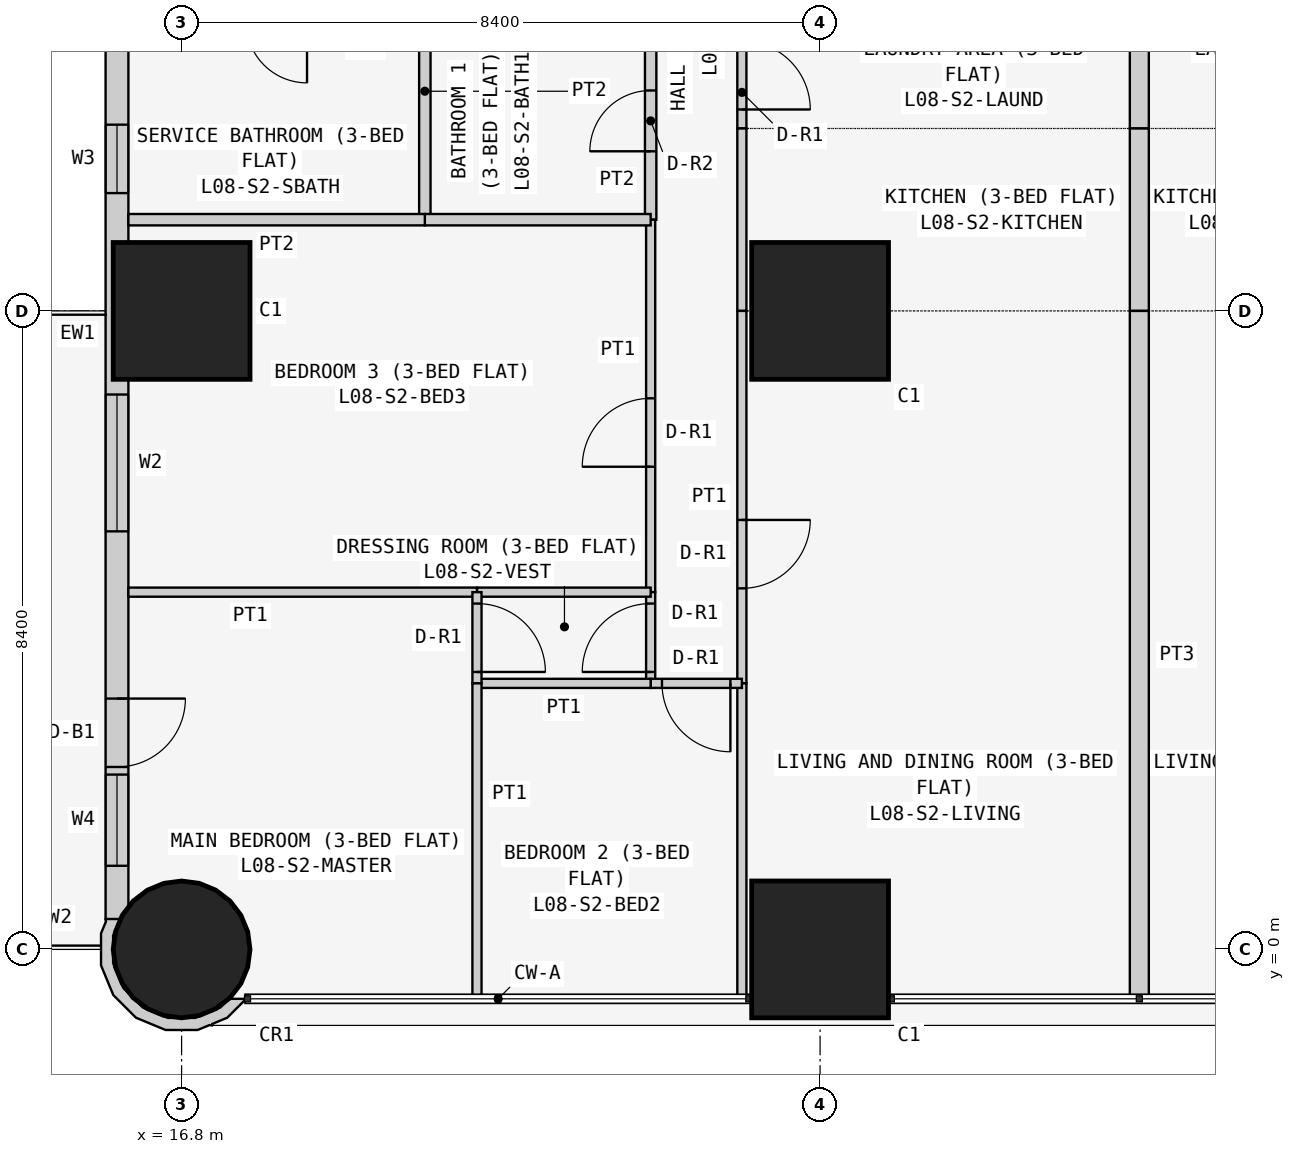
"""IFC4 building model, lengths in metres.
Left out: names, types, materials, properties, quantities, classifications, styles, units other than length and angle.
Written with IfcOpenShell. Run it as: python <this file> out.ifc"""

import sys

from ifc_helpers import new_model, si_unit, direction, frame, frame_2d, origin, origin_2d, place, context, subcontext, project, spatial, polyline, rectangle, circle, outline, extrude, element, fill, save


model = new_model("IFC4")
c1 = context("Model", 3, precision=1e-05, world=origin(), true_north=direction((0.0, 1.0)))
c2 = subcontext(c1, "Body", "Model", "MODEL_VIEW")
j1 = project(units=[si_unit("LENGTHUNIT", "METRE"), si_unit("PLANEANGLEUNIT", "RADIAN")], contexts=[c1])
p1 = place(None, origin())
s1 = spatial("IfcSite", under=j1, at=p1, CompositionType="ELEMENT")
p2 = place(p1, origin())
s2 = spatial("IfcBuilding", under=s1, at=p2, CompositionType="ELEMENT")
p3 = place(p2, frame((0.0, 0.0, 38.1)))
s3 = spatial("IfcBuildingStorey", under=s2, at=p3, CompositionType="ELEMENT", Elevation=38.1)
p4 = place(p3, frame((16.8, 0.0, 0.0), z_axis=(0.0, 0.0, 1.0), x_axis=(1.0, 0.0, 0.0)))
e1 = element("IfcColumn", 1, at=p4, inside=s3, PredefinedType="COLUMN", context=c2, shape_type="SweptSolid", body=[
    extrude(circle(Radius=0.9, at=origin_2d()), origin(), (0.0, 0.0, 1.0), 3.6),
])
for number, where, z_axis, x_axis in (
    (2, (16.8, 8.4, 0.0), (0.0, 0.0, 1.0), (1.0, 0.0, 0.0)),
    (3, (25.2, 0.0, 0.0), (0.0, 0.0, 1.0), (1.0, 0.0, 0.0)),
    (4, (25.2, 8.4, 0.0), (0.0, 0.0, 1.0), (1.0, 0.0, 0.0)),
):
    element("IfcColumn", number, at=place(p3, frame(where, z_axis=z_axis, x_axis=x_axis)), inside=s3, PredefinedType="COLUMN", context=c2, shape_type="SweptSolid", body=[
        extrude(rectangle(XDim=1.8, YDim=1.8, at=origin_2d()), origin(), (0.0, 0.0, 1.0), 3.6),
    ])
p5 = place(p3, frame((15.95, 15.8, 0.0), z_axis=(0.0, 0.0, 1.0), x_axis=(0.0, -1.0, 0.0)))
e5 = element("IfcWall", 5, at=p5, inside=s3, PredefinedType="SOLIDWALL", context=c2, shape_type="SweptSolid", body=[
    extrude(rectangle(XDim=15.4, YDim=0.3, at=frame_2d((7.7, 0.0))), origin(), (0.0, 0.0, 1.0), 3.45),
])
p6 = place(p5, frame((1.2, 0.0, 0.9)))
e6 = element("IfcOpeningElement", 6, at=p6, cuts=e5, PredefinedType="OPENING", context=c2, shape_type="SweptSolid", body=[
    extrude(rectangle(XDim=1.8, YDim=1.5, at=frame_2d((0.9, 0.75))), frame((0.0, 0.16, 0.0), z_axis=(0.0, -1.0, 0.0), x_axis=(1.0, 0.0, 0.0)), (0.0, 0.0, 1.0), 0.32),
])
p7 = place(p5, frame((4.95, 0.0, 1.5)))
e7 = element("IfcOpeningElement", 7, at=p7, cuts=e5, PredefinedType="OPENING", context=c2, shape_type="SweptSolid", body=[
    extrude(rectangle(XDim=0.9, YDim=0.7, at=frame_2d((0.45, 0.35))), frame((0.0, 0.16, 0.0), z_axis=(0.0, -1.0, 0.0), x_axis=(1.0, 0.0, 0.0)), (0.0, 0.0, 1.0), 0.32),
])
p8 = place(p5, frame((8.5, 0.0, 0.9)))
e8 = element("IfcOpeningElement", 8, at=p8, cuts=e5, PredefinedType="OPENING", context=c2, shape_type="SweptSolid", body=[
    extrude(rectangle(XDim=1.8, YDim=1.5, at=frame_2d((0.9, 0.75))), frame((0.0, 0.16, 0.0), z_axis=(0.0, -1.0, 0.0), x_axis=(1.0, 0.0, 0.0)), (0.0, 0.0, 1.0), 0.32),
])
p9 = place(p5, frame((12.5, 0.0, 0.0)))
e9 = element("IfcOpeningElement", 9, at=p9, cuts=e5, PredefinedType="OPENING", context=c2, shape_type="SweptSolid", body=[
    extrude(rectangle(XDim=0.9, YDim=2.4, at=frame_2d((0.45, 1.2))), frame((0.0, 0.16, 0.0), z_axis=(0.0, -1.0, 0.0), x_axis=(1.0, 0.0, 0.0)), (0.0, 0.0, 1.0), 0.32),
])
p10 = place(p5, frame((13.5, 0.0, 0.9)))
e10 = element("IfcOpeningElement", 10, at=p10, cuts=e5, PredefinedType="OPENING", context=c2, shape_type="SweptSolid", body=[
    extrude(rectangle(XDim=1.2, YDim=1.5, at=frame_2d((0.6, 0.75))), frame((0.0, 0.16, 0.0), z_axis=(0.0, -1.0, 0.0), x_axis=(1.0, 0.0, 0.0)), (0.0, 0.0, 1.0), 0.32),
])
p11 = place(p3, frame((15.89, 0.364, 0.0), z_axis=(0.0, 0.0, 1.0), x_axis=(-0.377204953059, -0.926129809145, 0.0)))
e11 = element("IfcWall", 11, at=p11, inside=s3, PredefinedType="SOLIDWALL", context=c2, shape_type="SweptSolid", body=[
    extrude(outline(polyline([(0.36, 1.803), (0.509, 1.741), (0.761, 1.486), (0.896, 1.154), (0.894, 0.795), (0.755, 0.465), (0.5, 0.213), (0.168, 0.078), (-0.1, 0.08), (0.001, -0.097), (0.03, -0.08), (0.199, -0.081), (0.589, 0.078), (0.889, 0.374), (1.053, 0.763), (1.055, 1.185), (0.896, 1.575), (0.778, 1.695), (0.769, 1.728), (0.75, 1.723), (0.6, 1.875), (0.295, 2.004), (0.281, 1.998), (0.36, 1.803)])), origin(), (0.0, 0.0, 1.0), 3.45),
])
p12 = place(p3, frame((29.4, 12.2, 0.0), z_axis=(0.0, 0.0, 1.0), x_axis=(0.0, -1.0, 0.0)))
e12 = element("IfcWall", 12, at=p12, inside=s3, PredefinedType="PARTITIONING", context=c2, shape_type="SweptSolid", body=[
    extrude(rectangle(XDim=1.4, YDim=0.25, at=frame_2d((0.7, 0.0))), origin(), (0.0, 0.0, 1.0), 2.848),
])
p13 = place(p3, frame((29.4, 10.8, 0.0), z_axis=(0.0, 0.0, 1.0), x_axis=(0.0, -1.0, 0.0)))
e13 = element("IfcWall", 13, at=p13, inside=s3, PredefinedType="PARTITIONING", context=c2, shape_type="SweptSolid", body=[
    extrude(rectangle(XDim=2.4, YDim=0.25, at=frame_2d((1.2, 0.0))), origin(), (0.0, 0.0, 1.0), 2.848),
])
p14 = place(p3, frame((29.4, 8.4, 0.0), z_axis=(0.0, 0.0, 1.0), x_axis=(0.0, -1.0, 0.0)))
e14 = element("IfcWall", 14, at=p14, inside=s3, PredefinedType="PARTITIONING", context=c2, shape_type="SweptSolid", body=[
    extrude(rectangle(XDim=9.05, YDim=0.25, at=frame_2d((4.525, 0.0))), origin(), (0.0, 0.0, 1.0), 2.848),
])
p15 = place(p3, frame((24.171, 10.8, 0.0), z_axis=(0.0, 0.0, 1.0), x_axis=(0.0, 1.0, 0.0)))
e15 = element("IfcWall", 15, at=p15, inside=s3, PredefinedType="PARTITIONING", context=c2, shape_type="SweptSolid", body=[
    extrude(rectangle(XDim=1.4, YDim=0.12, at=frame_2d((0.7, 0.0))), origin(), (0.0, 0.0, 1.0), 3.45),
])
p16 = place(p15, frame((0.25, 0.0, 0.0)))
e16 = element("IfcOpeningElement", 16, at=p16, cuts=e15, PredefinedType="OPENING", context=c2, shape_type="SweptSolid", body=[
    extrude(rectangle(XDim=0.9, YDim=2.1, at=frame_2d((0.45, 1.05))), frame((0.0, 0.07, 0.0), z_axis=(0.0, -1.0, 0.0), x_axis=(1.0, 0.0, 0.0)), (0.0, 0.0, 1.0), 0.14),
])
p17 = place(p3, frame((24.171, 8.4, 0.0), z_axis=(0.0, 0.0, 1.0), x_axis=(0.0, 1.0, 0.0)))
e17 = element("IfcWall", 17, at=p17, inside=s3, PredefinedType="PARTITIONING", context=c2, shape_type="SweptSolid", body=[
    extrude(rectangle(XDim=2.4, YDim=0.12, at=frame_2d((1.2, 0.0))), origin(), (0.0, 0.0, 1.0), 3.45),
])
p18 = place(p3, frame((24.171, 3.5, 0.0), z_axis=(0.0, 0.0, 1.0), x_axis=(0.0, 1.0, 0.0)))
e18 = element("IfcWall", 18, at=p18, inside=s3, PredefinedType="PARTITIONING", context=c2, shape_type="SweptSolid", body=[
    extrude(rectangle(XDim=4.9, YDim=0.12, at=frame_2d((2.45, 0.0))), origin(), (0.0, 0.0, 1.0), 3.45),
])
p19 = place(p18, frame((1.25, 0.0, 0.0)))
e19 = element("IfcOpeningElement", 19, at=p19, cuts=e18, PredefinedType="OPENING", context=c2, shape_type="SweptSolid", body=[
    extrude(rectangle(XDim=0.9, YDim=2.1, at=frame_2d((0.45, 1.05))), frame((0.0, 0.07, 0.0), z_axis=(0.0, -1.0, 0.0), x_axis=(1.0, 0.0, 0.0)), (0.0, 0.0, 1.0), 0.14),
])
p20 = place(p3, frame((24.171, -0.65, 0.0), z_axis=(0.0, 0.0, 1.0), x_axis=(0.0, 1.0, 0.0)))
e20 = element("IfcWall", 20, at=p20, inside=s3, PredefinedType="PARTITIONING", context=c2, shape_type="SweptSolid", body=[
    extrude(rectangle(XDim=4.15, YDim=0.12, at=frame_2d((2.075, 0.0))), origin(), (0.0, 0.0, 1.0), 3.45),
])
p21 = place(p3, frame((22.971, 9.6, 0.0), z_axis=(0.0, 0.0, 1.0), x_axis=(0.0, 1.0, 0.0)))
e21 = element("IfcWall", 21, at=p21, inside=s3, PredefinedType="PARTITIONING", context=c2, shape_type="SweptSolid", body=[
    extrude(rectangle(XDim=2.6, YDim=0.15, at=frame_2d((1.3, 0.0))), origin(), (0.0, 0.0, 1.0), 3.45),
])
p22 = place(p21, frame((0.9, 0.0, 0.0)))
e22 = element("IfcOpeningElement", 22, at=p22, cuts=e21, PredefinedType="OPENING", context=c2, shape_type="SweptSolid", body=[
    extrude(rectangle(XDim=0.8, YDim=2.1, at=frame_2d((0.4, 1.05))), frame((0.0, 0.085, 0.0), z_axis=(0.0, -1.0, 0.0), x_axis=(1.0, 0.0, 0.0)), (0.0, 0.0, 1.0), 0.17),
])
p23 = place(p3, frame((22.971, 4.7, 0.0), z_axis=(0.0, 0.0, 1.0), x_axis=(0.0, 1.0, 0.0)))
e23 = element("IfcWall", 23, at=p23, inside=s3, PredefinedType="PARTITIONING", context=c2, shape_type="SweptSolid", body=[
    extrude(rectangle(XDim=4.9, YDim=0.12, at=frame_2d((2.45, 0.0))), origin(), (0.0, 0.0, 1.0), 3.45),
])
p24 = place(p23, frame((1.65, 0.0, 0.0)))
e24 = element("IfcOpeningElement", 24, at=p24, cuts=e23, PredefinedType="OPENING", context=c2, shape_type="SweptSolid", body=[
    extrude(rectangle(XDim=0.9, YDim=2.1, at=frame_2d((0.45, 1.05))), frame((0.0, 0.07, 0.0), z_axis=(0.0, -1.0, 0.0), x_axis=(1.0, 0.0, 0.0)), (0.0, 0.0, 1.0), 0.14),
])
p25 = place(p3, frame((22.971, 3.5, 0.0), z_axis=(0.0, 0.0, 1.0), x_axis=(0.0, 1.0, 0.0)))
e25 = element("IfcWall", 25, at=p25, inside=s3, PredefinedType="PARTITIONING", context=c2, shape_type="SweptSolid", body=[
    extrude(rectangle(XDim=1.2, YDim=0.12, at=frame_2d((0.6, 0.0))), origin(), (0.0, 0.0, 1.0), 3.45),
])
p26 = place(p25, frame((0.15, 0.0, 0.0)))
e26 = element("IfcOpeningElement", 26, at=p26, cuts=e25, PredefinedType="OPENING", context=c2, shape_type="SweptSolid", body=[
    extrude(rectangle(XDim=0.9, YDim=2.1, at=frame_2d((0.45, 1.05))), frame((0.0, 0.07, 0.0), z_axis=(0.0, -1.0, 0.0), x_axis=(1.0, 0.0, 0.0)), (0.0, 0.0, 1.0), 0.14),
])
p27 = place(p3, frame((24.171, 3.5, 0.0), z_axis=(0.0, 0.0, 1.0), x_axis=(-1.0, 0.0, 0.0)))
e27 = element("IfcWall", 27, at=p27, inside=s3, PredefinedType="PARTITIONING", context=c2, shape_type="SweptSolid", body=[
    extrude(rectangle(XDim=1.2, YDim=0.12, at=frame_2d((0.6, 0.0))), origin(), (0.0, 0.0, 1.0), 3.45),
])
p28 = place(p27, frame((0.151, 0.0, 0.0)))
e28 = element("IfcOpeningElement", 28, at=p28, cuts=e27, PredefinedType="OPENING", context=c2, shape_type="SweptSolid", body=[
    extrude(rectangle(XDim=0.9, YDim=2.1, at=frame_2d((0.45, 1.05))), frame((0.0, 0.07, 0.0), z_axis=(0.0, -1.0, 0.0), x_axis=(1.0, 0.0, 0.0)), (0.0, 0.0, 1.0), 0.14),
])
p29 = place(p3, frame((20.0, 9.6, 0.0), z_axis=(0.0, 0.0, 1.0), x_axis=(0.0, 1.0, 0.0)))
e29 = element("IfcWall", 29, at=p29, inside=s3, PredefinedType="PARTITIONING", context=c2, shape_type="SweptSolid", body=[
    extrude(rectangle(XDim=2.6, YDim=0.15, at=frame_2d((1.3, 0.0))), origin(), (0.0, 0.0, 1.0), 3.45),
])
p30 = place(p3, frame((22.971, 9.6, 0.0), z_axis=(0.0, 0.0, 1.0), x_axis=(-1.0, 0.0, 0.0)))
e30 = element("IfcWall", 30, at=p30, inside=s3, PredefinedType="PARTITIONING", context=c2, shape_type="SweptSolid", body=[
    extrude(rectangle(XDim=2.971, YDim=0.15, at=frame_2d((1.485, 0.0))), origin(), (0.0, 0.0, 1.0), 3.45),
])
p31 = place(p3, frame((20.0, 9.6, 0.0), z_axis=(0.0, 0.0, 1.0), x_axis=(-1.0, 0.0, 0.0)))
e31 = element("IfcWall", 31, at=p31, inside=s3, PredefinedType="PARTITIONING", context=c2, shape_type="SweptSolid", body=[
    extrude(rectangle(XDim=3.9, YDim=0.15, at=frame_2d((1.95, 0.0))), origin(), (0.0, 0.0, 1.0), 3.45),
])
p32 = place(p3, frame((22.971, 4.7, 0.0), z_axis=(0.0, 0.0, 1.0), x_axis=(-1.0, 0.0, 0.0)))
e32 = element("IfcWall", 32, at=p32, inside=s3, PredefinedType="PARTITIONING", context=c2, shape_type="SweptSolid", body=[
    extrude(rectangle(XDim=2.285, YDim=0.12, at=frame_2d((1.143, 0.0))), origin(), (0.0, 0.0, 1.0), 3.45),
])
p33 = place(p3, frame((20.686, 4.7, 0.0), z_axis=(0.0, 0.0, 1.0), x_axis=(-1.0, 0.0, 0.0)))
e33 = element("IfcWall", 33, at=p33, inside=s3, PredefinedType="PARTITIONING", context=c2, shape_type="SweptSolid", body=[
    extrude(rectangle(XDim=4.586, YDim=0.12, at=frame_2d((2.293, 0.0))), origin(), (0.0, 0.0, 1.0), 3.45),
])
p34 = place(p3, frame((22.971, 3.5, 0.0), z_axis=(0.0, 0.0, 1.0), x_axis=(-1.0, 0.0, 0.0)))
e34 = element("IfcWall", 34, at=p34, inside=s3, PredefinedType="PARTITIONING", context=c2, shape_type="SweptSolid", body=[
    extrude(rectangle(XDim=2.285, YDim=0.12, at=frame_2d((1.143, 0.0))), origin(), (0.0, 0.0, 1.0), 3.45),
])
p35 = place(p3, frame((20.686, 3.5, 0.0), z_axis=(0.0, 0.0, 1.0), x_axis=(0.0, 1.0, 0.0)))
e35 = element("IfcWall", 35, at=p35, inside=s3, PredefinedType="PARTITIONING", context=c2, shape_type="SweptSolid", body=[
    extrude(rectangle(XDim=1.2, YDim=0.12, at=frame_2d((0.6, 0.0))), origin(), (0.0, 0.0, 1.0), 3.45),
])
p36 = place(p35, frame((0.15, 0.0, 0.0)))
e36 = element("IfcOpeningElement", 36, at=p36, cuts=e35, PredefinedType="OPENING", context=c2, shape_type="SweptSolid", body=[
    extrude(rectangle(XDim=0.9, YDim=2.1, at=frame_2d((0.45, 1.05))), frame((0.0, 0.07, 0.0), z_axis=(0.0, -1.0, 0.0), x_axis=(1.0, 0.0, 0.0)), (0.0, 0.0, 1.0), 0.14),
])
p37 = place(p3, frame((20.686, -0.65, 0.0), z_axis=(0.0, 0.0, 1.0), x_axis=(0.0, 1.0, 0.0)))
e37 = element("IfcWall", 37, at=p37, inside=s3, PredefinedType="PARTITIONING", context=c2, shape_type="SweptSolid", body=[
    extrude(rectangle(XDim=4.15, YDim=0.12, at=frame_2d((2.075, 0.0))), origin(), (0.0, 0.0, 1.0), 3.45),
])
p38 = place(p7, origin())
e38 = element("IfcWindow", 38, at=p38, inside=s3, PartitioningType="SINGLE_PANEL", PredefinedType="WINDOW", context=c2, shape_type="SweptSolid", body=[
    extrude(rectangle(XDim=0.9, YDim=0.7, at=frame_2d((0.45, 0.35))), frame((0.0, 0.03, 0.0), z_axis=(0.0, -1.0, 0.0), x_axis=(1.0, 0.0, 0.0)), (0.0, 0.0, 1.0), 0.06),
])
fill(e7, e38)
p39 = place(p8, origin())
e39 = element("IfcWindow", 39, at=p39, inside=s3, PartitioningType="SINGLE_PANEL", PredefinedType="WINDOW", context=c2, shape_type="SweptSolid", body=[
    extrude(rectangle(XDim=1.8, YDim=1.5, at=frame_2d((0.9, 0.75))), frame((0.0, 0.03, 0.0), z_axis=(0.0, -1.0, 0.0), x_axis=(1.0, 0.0, 0.0)), (0.0, 0.0, 1.0), 0.06),
])
fill(e8, e39)
p40 = place(p9, origin())
e40 = element("IfcDoor", 40, at=p40, inside=s3, OperationType="SINGLE_SWING_LEFT", PredefinedType="DOOR", context=c2, shape_type="SweptSolid", body=[
    extrude(rectangle(XDim=0.9, YDim=2.4, at=frame_2d((0.45, 1.2))), frame((0.0, 0.025, 0.0), z_axis=(0.0, -1.0, 0.0), x_axis=(1.0, 0.0, 0.0)), (0.0, 0.0, 1.0), 0.05),
])
fill(e9, e40)
p41 = place(p10, origin())
e41 = element("IfcWindow", 41, at=p41, inside=s3, PartitioningType="SINGLE_PANEL", PredefinedType="WINDOW", context=c2, shape_type="SweptSolid", body=[
    extrude(rectangle(XDim=1.2, YDim=1.5, at=frame_2d((0.6, 0.75))), frame((0.0, 0.03, 0.0), z_axis=(0.0, -1.0, 0.0), x_axis=(1.0, 0.0, 0.0)), (0.0, 0.0, 1.0), 0.06),
])
fill(e10, e41)
p42 = place(p16, frame((0.9, 0.0, 0.0), z_axis=(0.0, 0.0, 1.0), x_axis=(-1.0, 0.0, 0.0)))
e42 = element("IfcDoor", 42, at=p42, inside=s3, OperationType="SINGLE_SWING_RIGHT", PredefinedType="DOOR", context=c2, shape_type="SweptSolid", body=[
    extrude(rectangle(XDim=0.9, YDim=2.1, at=frame_2d((0.45, 1.05))), frame((0.0, 0.025, 0.0), z_axis=(0.0, -1.0, 0.0), x_axis=(1.0, 0.0, 0.0)), (0.0, 0.0, 1.0), 0.05),
])
fill(e16, e42)
p43 = place(p19, frame((0.9, 0.0, 0.0), z_axis=(0.0, 0.0, 1.0), x_axis=(-1.0, 0.0, 0.0)))
e43 = element("IfcDoor", 43, at=p43, inside=s3, OperationType="SINGLE_SWING_LEFT", PredefinedType="DOOR", context=c2, shape_type="SweptSolid", body=[
    extrude(rectangle(XDim=0.9, YDim=2.1, at=frame_2d((0.45, 1.05))), frame((0.0, 0.025, 0.0), z_axis=(0.0, -1.0, 0.0), x_axis=(1.0, 0.0, 0.0)), (0.0, 0.0, 1.0), 0.05),
])
fill(e19, e43)
p44 = place(p22, origin())
e44 = element("IfcDoor", 44, at=p44, inside=s3, OperationType="SINGLE_SWING_LEFT", PredefinedType="DOOR", context=c2, shape_type="SweptSolid", body=[
    extrude(rectangle(XDim=0.8, YDim=2.1, at=frame_2d((0.4, 1.05))), frame((0.0, 0.025, 0.0), z_axis=(0.0, -1.0, 0.0), x_axis=(1.0, 0.0, 0.0)), (0.0, 0.0, 1.0), 0.05),
])
fill(e22, e44)
p45 = place(p24, origin())
e45 = element("IfcDoor", 45, at=p45, inside=s3, OperationType="SINGLE_SWING_LEFT", PredefinedType="DOOR", context=c2, shape_type="SweptSolid", body=[
    extrude(rectangle(XDim=0.9, YDim=2.1, at=frame_2d((0.45, 1.05))), frame((0.0, 0.025, 0.0), z_axis=(0.0, -1.0, 0.0), x_axis=(1.0, 0.0, 0.0)), (0.0, 0.0, 1.0), 0.05),
])
fill(e24, e45)
p46 = place(p26, origin())
e46 = element("IfcDoor", 46, at=p46, inside=s3, OperationType="SINGLE_SWING_LEFT", PredefinedType="DOOR", context=c2, shape_type="SweptSolid", body=[
    extrude(rectangle(XDim=0.9, YDim=2.1, at=frame_2d((0.45, 1.05))), frame((0.0, 0.025, 0.0), z_axis=(0.0, -1.0, 0.0), x_axis=(1.0, 0.0, 0.0)), (0.0, 0.0, 1.0), 0.05),
])
fill(e26, e46)
p47 = place(p36, frame((0.9, 0.0, 0.0), z_axis=(0.0, 0.0, 1.0), x_axis=(-1.0, 0.0, 0.0)))
e47 = element("IfcDoor", 47, at=p47, inside=s3, OperationType="SINGLE_SWING_RIGHT", PredefinedType="DOOR", context=c2, shape_type="SweptSolid", body=[
    extrude(rectangle(XDim=0.9, YDim=2.1, at=frame_2d((0.45, 1.05))), frame((0.0, 0.025, 0.0), z_axis=(0.0, -1.0, 0.0), x_axis=(1.0, 0.0, 0.0)), (0.0, 0.0, 1.0), 0.05),
])
fill(e36, e47)
p48 = place(p28, origin())
e48 = element("IfcDoor", 48, at=p48, inside=s3, OperationType="SINGLE_SWING_LEFT", PredefinedType="DOOR", context=c2, shape_type="SweptSolid", body=[
    extrude(rectangle(XDim=0.9, YDim=2.1, at=frame_2d((0.45, 1.05))), frame((0.0, 0.025, 0.0), z_axis=(0.0, -1.0, 0.0), x_axis=(1.0, 0.0, 0.0)), (0.0, 0.0, 1.0), 0.05),
])
fill(e28, e48)
save(model, sys.argv[1])
